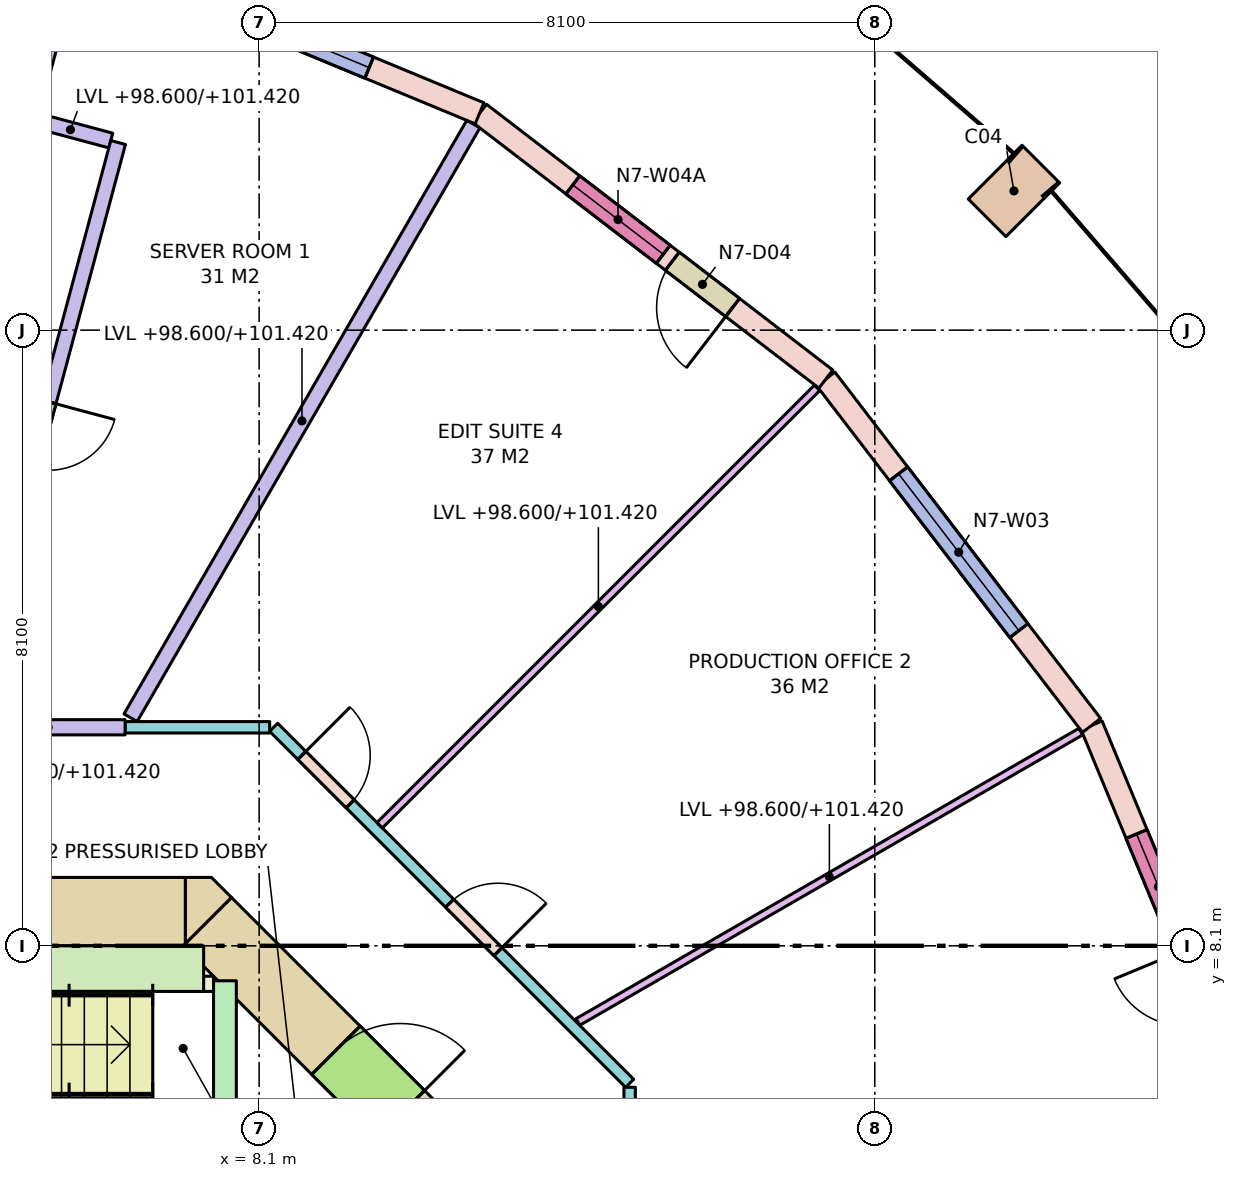
"""IFC4 building model, lengths in metres.
Left out: names, types, materials, properties, quantities, classifications, styles, units other than length and angle.
Written with IfcOpenShell. Run it as: python <this file> out.ifc"""

import sys

from ifc_helpers import new_model, si_unit, direction, frame, frame_2d, origin, origin_2d, place, context, subcontext, project, spatial, polyline, rectangle, outline, extrude, element, fill, save


model = new_model("IFC4")
c1 = context("Model", 3, precision=1e-05, world=origin(), true_north=direction((0.0, 1.0)))
c2 = subcontext(c1, "Body", "Model", "MODEL_VIEW")
j1 = project(units=[si_unit("LENGTHUNIT", "METRE"), si_unit("PLANEANGLEUNIT", "RADIAN")], contexts=[c1])
p1 = place(None, origin())
s1 = spatial("IfcSite", under=j1, at=p1, CompositionType="ELEMENT")
p2 = place(p1, origin())
s2 = spatial("IfcBuilding", under=s1, at=p2, CompositionType="ELEMENT")
p3 = place(p2, frame((0.0, 0.0, 98.6)))
s3 = spatial("IfcBuildingStorey", under=s2, at=p3, CompositionType="ELEMENT", Elevation=98.6)
p4 = place(p3, frame((18.031, 18.031, 0.0), z_axis=(0.0, 0.0, 1.0), x_axis=(-0.707106781187, 0.707106781187, 0.0)))
e1 = element("IfcColumn", 1, at=p4, inside=s3, PredefinedType="COLUMN", context=c2, shape_type="SweptSolid", body=[
    extrude(rectangle(XDim=0.7, YDim=1.0, at=origin_2d()), origin(), (0.0, 0.0, 1.0), 4.0),
])
p5 = place(p3, frame((-7.13, 8.55, -0.28), z_axis=(0.0, 0.0, 1.0), x_axis=(1.0, 0.0, 0.0)))
e2 = element("IfcWall", 2, at=p5, inside=s3, PredefinedType="SHEAR", context=c2, shape_type="SweptSolid", body=[
    extrude(rectangle(XDim=14.26, YDim=0.9, at=frame_2d((7.13, 0.0))), origin(), (0.0, 0.0, 1.0), 4.0),
])
p6 = place(p5, frame((5.48, 0.0, 0.28)))
e3 = element("IfcOpeningElement", 3, at=p6, cuts=e2, PredefinedType="OPENING", context=c2, shape_type="SweptSolid", body=[
    extrude(rectangle(XDim=0.7, YDim=2.1, at=frame_2d((0.35, 1.05))), frame((0.0, 0.46, 0.0), z_axis=(0.0, -1.0, 0.0), x_axis=(1.0, 0.0, 0.0)), (0.0, 0.0, 1.0), 0.92),
])
p7 = place(p5, frame((7.155, 0.0, 0.28)))
e4 = element("IfcOpeningElement", 4, at=p7, cuts=e2, PredefinedType="OPENING", context=c2, shape_type="SweptSolid", body=[
    extrude(rectangle(XDim=0.9, YDim=2.1, at=frame_2d((0.45, 1.05))), frame((0.0, 0.46, 0.0), z_axis=(0.0, -1.0, 0.0), x_axis=(1.0, 0.0, 0.0)), (0.0, 0.0, 1.0), 0.92),
])
p8 = place(p3, frame((7.418, 8.418, -0.28), z_axis=(0.0, 0.0, 1.0), x_axis=(0.707106781187, -0.707106781187, 0.0)))
e5 = element("IfcWall", 5, at=p8, inside=s3, PredefinedType="SHEAR", context=c2, shape_type="SweptSolid", body=[
    extrude(rectangle(XDim=4.243, YDim=0.9, at=frame_2d((2.121, 0.0))), origin(), (0.0, 0.0, 1.0), 4.0),
])
p9 = place(p8, frame((2.393, 0.0, 0.28)))
e6 = element("IfcOpeningElement", 6, at=p9, cuts=e5, PredefinedType="OPENING", context=c2, shape_type="SweptSolid", body=[
    extrude(rectangle(XDim=1.2, YDim=2.1, at=frame_2d((0.6, 1.05))), frame((0.0, 0.46, 0.0), z_axis=(0.0, -1.0, 0.0), x_axis=(1.0, 0.0, 0.0)), (0.0, 0.0, 1.0), 0.92),
])
p10 = place(p3, frame((0.0, 0.0, -0.28)))
e7 = element("IfcWall", 7, at=p10, inside=s3, PredefinedType="SHEAR", context=c2, shape_type="SweptSolid", body=[
    extrude(outline(polyline([(7.473, 9.0), (7.736, 8.736), (7.13, 8.13), (7.13, 9.0), (7.473, 9.0)])), origin(), (0.0, 0.0, 1.0), 4.0),
])
p11 = place(p3, frame((7.65, 4.5, 0.0), z_axis=(0.0, 0.0, 1.0), x_axis=(0.0, 1.0, 0.0)))
e8 = element("IfcWall", 8, at=p11, inside=s3, PredefinedType="SHEAR", context=c2, shape_type="SweptSolid", body=[
    extrude(rectangle(XDim=3.14, YDim=0.3, at=frame_2d((1.57, 0.0))), origin(), (0.0, 0.0, 1.0), 3.72),
])
p12 = place(p11, frame((0.14, 0.0, 0.0)))
e9 = element("IfcOpeningElement", 9, at=p12, cuts=e8, PredefinedType="OPENING", context=c2, shape_type="SweptSolid", body=[
    extrude(rectangle(XDim=1.32, YDim=2.1, at=frame_2d((0.66, 1.05))), frame((0.0, 0.16, 0.0), z_axis=(0.0, -1.0, 0.0), x_axis=(1.0, 0.0, 0.0)), (0.0, 0.0, 1.0), 0.32),
])
p13 = place(p3, frame((2.0, 7.8, 0.0), z_axis=(0.0, 0.0, 1.0), x_axis=(1.0, 0.0, 0.0)))
e10 = element("IfcWall", 10, at=p13, inside=s3, PredefinedType="SHEAR", context=c2, shape_type="SweptSolid", body=[
    extrude(rectangle(XDim=5.37, YDim=0.6, at=frame_2d((2.685, 0.0))), origin(), (0.0, 0.0, 1.0), 3.72),
])
p14 = place(p3, frame((6.9, 7.6, 0.0), z_axis=(0.0, 0.0, 1.0), x_axis=(1.0, 0.0, 0.0)))
e11 = element("IfcWall", 11, at=p14, inside=s3, PredefinedType="SHEAR", context=c2, shape_type="SweptSolid", body=[
    extrude(rectangle(XDim=0.6, YDim=0.2, at=frame_2d((0.3, 0.0))), origin(), (0.0, 0.0, 1.0), 3.72),
])
p15 = place(p3, frame((21.25, 5.694, 0.0), z_axis=(0.0, 0.0, 1.0), x_axis=(-0.382715966503, 0.923866055759, 0.0)))
e12 = element("IfcWall", 12, at=p15, inside=s3, PredefinedType="STANDARD", context=c2, shape_type="SweptSolid", body=[
    extrude(rectangle(XDim=5.743, YDim=0.3, at=frame_2d((2.872, 0.0))), origin(), (0.0, 0.0, 1.0), 3.72),
])
p16 = place(p15, frame((1.547, 0.0, 0.0)))
e13 = element("IfcOpeningElement", 13, at=p16, cuts=e12, PredefinedType="OPENING", context=c2, shape_type="SweptSolid", body=[
    extrude(rectangle(XDim=1.0, YDim=2.4, at=frame_2d((0.5, 1.2))), frame((0.0, 0.16, 0.0), z_axis=(0.0, -1.0, 0.0), x_axis=(1.0, 0.0, 0.0)), (0.0, 0.0, 1.0), 0.32),
])
p17 = place(p15, frame((2.697, 0.0, 0.8)))
e14 = element("IfcOpeningElement", 14, at=p17, cuts=e12, PredefinedType="OPENING", context=c2, shape_type="SweptSolid", body=[
    extrude(rectangle(XDim=1.5, YDim=2.7, at=frame_2d((0.75, 1.35))), frame((0.0, 0.16, 0.0), z_axis=(0.0, -1.0, 0.0), x_axis=(1.0, 0.0, 0.0)), (0.0, 0.0, 1.0), 0.32),
])
p18 = place(p3, frame((19.052, 11.0, 0.0), z_axis=(0.0, 0.0, 1.0), x_axis=(-0.608744744291, 0.793366142647, 0.0)))
e15 = element("IfcWall", 15, at=p18, inside=s3, PredefinedType="STANDARD", context=c2, shape_type="SweptSolid", body=[
    extrude(rectangle(XDim=5.743, YDim=0.3, at=frame_2d((2.872, 0.0))), origin(), (0.0, 0.0, 1.0), 3.72),
])
p19 = place(p18, frame((1.572, 0.0, 0.8)))
e16 = element("IfcOpeningElement", 16, at=p19, cuts=e15, PredefinedType="OPENING", context=c2, shape_type="SweptSolid", body=[
    extrude(rectangle(XDim=2.6, YDim=2.7, at=frame_2d((1.3, 1.35))), frame((0.0, 0.16, 0.0), z_axis=(0.0, -1.0, 0.0), x_axis=(1.0, 0.0, 0.0)), (0.0, 0.0, 1.0), 0.32),
])
p20 = place(p3, frame((15.556, 15.556, 0.0), z_axis=(0.0, 0.0, 1.0), x_axis=(-0.793366142647, 0.608744744291, 0.0)))
e17 = element("IfcWall", 17, at=p20, inside=s3, PredefinedType="STANDARD", context=c2, shape_type="SweptSolid", body=[
    extrude(rectangle(XDim=5.743, YDim=0.3, at=frame_2d((2.872, 0.0))), origin(), (0.0, 0.0, 1.0), 3.72),
])
p21 = place(p20, frame((1.547, 0.0, 0.0)))
e18 = element("IfcOpeningElement", 18, at=p21, cuts=e17, PredefinedType="OPENING", context=c2, shape_type="SweptSolid", body=[
    extrude(rectangle(XDim=1.0, YDim=2.4, at=frame_2d((0.5, 1.2))), frame((0.0, 0.16, 0.0), z_axis=(0.0, -1.0, 0.0), x_axis=(1.0, 0.0, 0.0)), (0.0, 0.0, 1.0), 0.32),
])
p22 = place(p20, frame((2.697, 0.0, 0.8)))
e19 = element("IfcOpeningElement", 19, at=p22, cuts=e17, PredefinedType="OPENING", context=c2, shape_type="SweptSolid", body=[
    extrude(rectangle(XDim=1.5, YDim=2.7, at=frame_2d((0.75, 1.35))), frame((0.0, 0.16, 0.0), z_axis=(0.0, -1.0, 0.0), x_axis=(1.0, 0.0, 0.0)), (0.0, 0.0, 1.0), 0.32),
])
p23 = place(p3, frame((11.0, 19.052, 0.0), z_axis=(0.0, 0.0, 1.0), x_axis=(-0.923866055759, 0.382715966503, 0.0)))
e20 = element("IfcWall", 20, at=p23, inside=s3, PredefinedType="STANDARD", context=c2, shape_type="SweptSolid", body=[
    extrude(rectangle(XDim=5.743, YDim=0.3, at=frame_2d((2.872, 0.0))), origin(), (0.0, 0.0, 1.0), 3.72),
])
p24 = place(p23, frame((1.572, 0.0, 0.8)))
e21 = element("IfcOpeningElement", 21, at=p24, cuts=e20, PredefinedType="OPENING", context=c2, shape_type="SweptSolid", body=[
    extrude(rectangle(XDim=2.6, YDim=2.7, at=frame_2d((1.3, 1.35))), frame((0.0, 0.16, 0.0), z_axis=(0.0, -1.0, 0.0), x_axis=(1.0, 0.0, 0.0)), (0.0, 0.0, 1.0), 0.32),
])
p25 = place(p3, frame((5.085, 18.979, 0.0), z_axis=(0.0, 0.0, 1.0), x_axis=(0.965932200741, -0.258795254151, 0.0)))
e22 = element("IfcWall", 22, at=p25, inside=s3, PredefinedType="PARTITIONING", context=c2, shape_type="SweptSolid", body=[
    extrude(rectangle(XDim=1.1, YDim=0.2, at=frame_2d((0.55, 0.0))), origin(), (0.0, 0.0, 1.0), 2.82),
])
p26 = place(p3, frame((6.245, 18.669, 0.0), z_axis=(0.0, 0.0, 1.0), x_axis=(-0.258822393938, -0.965924928965, 0.0)))
e23 = element("IfcWall", 23, at=p26, inside=s3, PredefinedType="PARTITIONING", context=c2, shape_type="SweptSolid", body=[
    extrude(rectangle(XDim=7.965, YDim=0.2, at=frame_2d((3.982, 0.0))), origin(), (0.0, 0.0, 1.0), 3.72),
])
p27 = place(p26, frame((3.532, 0.0, 0.0)))
e24 = element("IfcOpeningElement", 24, at=p27, cuts=e23, PredefinedType="OPENING", context=c2, shape_type="SweptSolid", body=[
    extrude(rectangle(XDim=0.9, YDim=2.1, at=frame_2d((0.45, 1.05))), frame((0.0, 0.11, 0.0), z_axis=(0.0, -1.0, 0.0), x_axis=(1.0, 0.0, 0.0)), (0.0, 0.0, 1.0), 0.22),
])
p28 = place(p3, frame((4.313, 10.975, 0.0), z_axis=(0.0, 0.0, 1.0), x_axis=(1.0, 0.0, 0.0)))
e25 = element("IfcWall", 25, at=p28, inside=s3, PredefinedType="PARTITIONING", context=c2, shape_type="SweptSolid", body=[
    extrude(rectangle(XDim=2.023, YDim=0.2, at=frame_2d((1.012, 0.0))), origin(), (0.0, 0.0, 1.0), 2.82),
])
p29 = place(p3, frame((6.336, 10.975, 0.0), z_axis=(0.0, 0.0, 1.0), x_axis=(1.0, 0.0, 0.0)))
e26 = element("IfcWall", 26, at=p29, inside=s3, PredefinedType="PARTITIONING", context=c2, shape_type="SweptSolid", body=[
    extrude(rectangle(XDim=1.902, YDim=0.15, at=frame_2d((0.951, 0.0))), origin(), (0.0, 0.0, 1.0), 2.82),
])
p30 = place(p3, frame((8.291, 10.975, 0.0), z_axis=(0.0, 0.0, 1.0), x_axis=(0.707106781187, -0.707106781187, 0.0)))
e27 = element("IfcWall", 27, at=p30, inside=s3, PredefinedType="PARTITIONING", context=c2, shape_type="SweptSolid", body=[
    extrude(rectangle(XDim=6.624, YDim=0.15, at=frame_2d((3.312, 0.0))), origin(), (0.0, 0.0, 1.0), 2.82),
])
p31 = place(p30, frame((3.274, 0.0, 0.0)))
e28 = element("IfcOpeningElement", 28, at=p31, cuts=e27, PredefinedType="OPENING", context=c2, shape_type="SweptSolid", body=[
    extrude(rectangle(XDim=0.9, YDim=2.1, at=frame_2d((0.45, 1.05))), frame((0.0, 0.085, 0.0), z_axis=(0.0, -1.0, 0.0), x_axis=(1.0, 0.0, 0.0)), (0.0, 0.0, 1.0), 0.17),
])
p32 = place(p30, frame((0.524, 0.0, 0.0)))
e29 = element("IfcOpeningElement", 29, at=p32, cuts=e27, PredefinedType="OPENING", context=c2, shape_type="SweptSolid", body=[
    extrude(rectangle(XDim=0.9, YDim=2.1, at=frame_2d((0.45, 1.05))), frame((0.0, 0.085, 0.0), z_axis=(0.0, -1.0, 0.0), x_axis=(1.0, 0.0, 0.0)), (0.0, 0.0, 1.0), 0.17),
])
p33 = place(p3, frame((12.975, 6.238, 0.0), z_axis=(0.0, 0.0, 1.0), x_axis=(0.0, -1.0, 0.0)))
e30 = element("IfcWall", 30, at=p33, inside=s3, PredefinedType="PARTITIONING", context=c2, shape_type="SweptSolid", body=[
    extrude(rectangle(XDim=4.963, YDim=0.15, at=frame_2d((2.482, 0.0))), origin(), (0.0, 0.0, 1.0), 2.82),
])
p34 = place(p3, frame((12.294, 7.098, 0.0), z_axis=(0.0, 0.0, 1.0), x_axis=(0.866010520791, 0.500025777215, 0.0)))
e31 = element("IfcWall", 31, at=p34, inside=s3, PredefinedType="PARTITIONING", context=c2, shape_type="SweptSolid", body=[
    extrude(rectangle(XDim=7.641, YDim=0.1, at=frame_2d((3.82, 0.0))), origin(), (0.0, 0.0, 1.0), 2.82),
])
p35 = place(p3, frame((9.686, 9.686, 0.0), z_axis=(0.0, 0.0, 1.0), x_axis=(0.707106781187, 0.707106781187, 0.0)))
e32 = element("IfcWall", 32, at=p35, inside=s3, PredefinedType="PARTITIONING", context=c2, shape_type="SweptSolid", body=[
    extrude(rectangle(XDim=8.139, YDim=0.1, at=frame_2d((4.069, 0.0))), origin(), (0.0, 0.0, 1.0), 2.82),
])
p36 = place(p3, frame((6.409, 11.101, 0.0), z_axis=(0.0, 0.0, 1.0), x_axis=(0.500008327793, 0.866020595677, 0.0)))
e33 = element("IfcWall", 33, at=p36, inside=s3, PredefinedType="PARTITIONING", context=c2, shape_type="SweptSolid", body=[
    extrude(rectangle(XDim=9.019, YDim=0.2, at=frame_2d((4.509, 0.0))), origin(), (0.0, 0.0, 1.0), 2.82),
])
p37 = place(p3, frame((5.111, 19.076, 0.0), z_axis=(0.0, 0.0, 1.0), x_axis=(0.258870505712, 0.965912035991, 0.0)))
e34 = element("IfcWall", 34, at=p37, inside=s3, PredefinedType="PARTITIONING", context=c2, shape_type="SweptSolid", body=[
    extrude(rectangle(XDim=2.088, YDim=0.2, at=frame_2d((1.044, 0.0))), origin(), (0.0, 0.0, 1.0), 2.82),
])
p38 = place(p17, origin())
e35 = element("IfcWindow", 35, at=p38, inside=s3, PartitioningType="SINGLE_PANEL", PredefinedType="WINDOW", context=c2, shape_type="SweptSolid", body=[
    extrude(rectangle(XDim=1.5, YDim=2.7, at=frame_2d((0.75, 1.35))), frame((0.0, 0.03, 0.0), z_axis=(0.0, -1.0, 0.0), x_axis=(1.0, 0.0, 0.0)), (0.0, 0.0, 1.0), 0.06),
])
fill(e14, e35)
p39 = place(p19, origin())
e36 = element("IfcWindow", 36, at=p39, inside=s3, PartitioningType="SINGLE_PANEL", PredefinedType="WINDOW", context=c2, shape_type="SweptSolid", body=[
    extrude(rectangle(XDim=2.6, YDim=2.7, at=frame_2d((1.3, 1.35))), frame((0.0, 0.03, 0.0), z_axis=(0.0, -1.0, 0.0), x_axis=(1.0, 0.0, 0.0)), (0.0, 0.0, 1.0), 0.06),
])
fill(e16, e36)
p40 = place(p21, origin())
e37 = element("IfcDoor", 37, at=p40, inside=s3, OperationType="SINGLE_SWING_LEFT", PredefinedType="DOOR", context=c2, shape_type="SweptSolid", body=[
    extrude(rectangle(XDim=1.0, YDim=2.4, at=frame_2d((0.5, 1.2))), frame((0.0, 0.025, 0.0), z_axis=(0.0, -1.0, 0.0), x_axis=(1.0, 0.0, 0.0)), (0.0, 0.0, 1.0), 0.05),
])
fill(e18, e37)
p41 = place(p22, origin())
e38 = element("IfcWindow", 38, at=p41, inside=s3, PartitioningType="SINGLE_PANEL", PredefinedType="WINDOW", context=c2, shape_type="SweptSolid", body=[
    extrude(rectangle(XDim=1.5, YDim=2.7, at=frame_2d((0.75, 1.35))), frame((0.0, 0.03, 0.0), z_axis=(0.0, -1.0, 0.0), x_axis=(1.0, 0.0, 0.0)), (0.0, 0.0, 1.0), 0.06),
])
fill(e19, e38)
p42 = place(p24, origin())
e39 = element("IfcWindow", 39, at=p42, inside=s3, PartitioningType="SINGLE_PANEL", PredefinedType="WINDOW", context=c2, shape_type="SweptSolid", body=[
    extrude(rectangle(XDim=2.6, YDim=2.7, at=frame_2d((1.3, 1.35))), frame((0.0, 0.03, 0.0), z_axis=(0.0, -1.0, 0.0), x_axis=(1.0, 0.0, 0.0)), (0.0, 0.0, 1.0), 0.06),
])
fill(e21, e39)
p43 = place(p9, origin())
e40 = element("IfcDoor", 40, at=p43, inside=s3, OperationType="SINGLE_SWING_RIGHT", PredefinedType="DOOR", context=c2, shape_type="SweptSolid", body=[
    extrude(rectangle(XDim=1.2, YDim=2.1, at=frame_2d((0.6, 1.05))), frame((0.0, 0.025, 0.0), z_axis=(0.0, -1.0, 0.0), x_axis=(1.0, 0.0, 0.0)), (0.0, 0.0, 1.0), 0.05),
])
fill(e6, e40)
p44 = place(p31, origin())
e41 = element("IfcDoor", 41, at=p44, inside=s3, OperationType="SINGLE_SWING_RIGHT", PredefinedType="DOOR", context=c2, shape_type="SweptSolid", body=[
    extrude(rectangle(XDim=0.9, YDim=2.1, at=frame_2d((0.45, 1.05))), frame((0.0, 0.025, 0.0), z_axis=(0.0, -1.0, 0.0), x_axis=(1.0, 0.0, 0.0)), (0.0, 0.0, 1.0), 0.05),
])
fill(e28, e41)
p45 = place(p32, origin())
e42 = element("IfcDoor", 42, at=p45, inside=s3, OperationType="SINGLE_SWING_LEFT", PredefinedType="DOOR", context=c2, shape_type="SweptSolid", body=[
    extrude(rectangle(XDim=0.9, YDim=2.1, at=frame_2d((0.45, 1.05))), frame((0.0, 0.025, 0.0), z_axis=(0.0, -1.0, 0.0), x_axis=(1.0, 0.0, 0.0)), (0.0, 0.0, 1.0), 0.05),
])
fill(e29, e42)
save(model, sys.argv[1])
